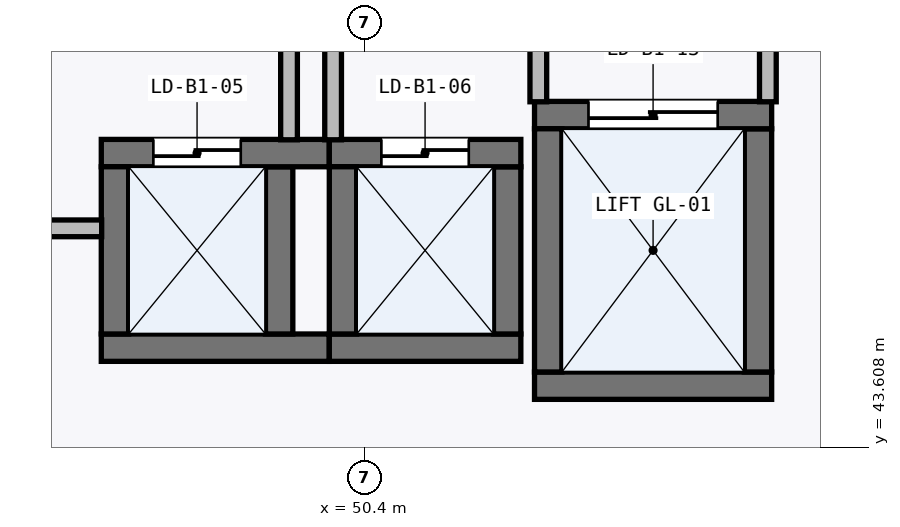
"""IFC4 building model, lengths in metres.
Left out: names, types, materials, properties, quantities, classifications, styles, units other than length and angle.
Written with IfcOpenShell. Run it as: python <this file> out.ifc"""

import sys

from ifc_helpers import new_model, si_unit, direction, frame, frame_2d, origin, place, context, subcontext, project, spatial, rectangle, extrude, element, fill, save


model = new_model("IFC4")
c1 = context("Model", 3, precision=1e-05, world=origin(), true_north=direction((0.0, 1.0)))
c2 = subcontext(c1, "Body", "Model", "MODEL_VIEW")
j1 = project(units=[si_unit("LENGTHUNIT", "METRE"), si_unit("PLANEANGLEUNIT", "RADIAN")], contexts=[c1])
p1 = place(None, origin())
s1 = spatial("IfcSite", under=j1, at=p1, CompositionType="ELEMENT")
p2 = place(p1, origin())
s2 = spatial("IfcBuilding", under=s1, at=p2, CompositionType="ELEMENT")
p3 = place(p2, frame((0.0, 0.0, -5.4)))
s3 = spatial("IfcBuildingStorey", under=s2, at=p3, CompositionType="ELEMENT", Elevation=-5.4)
p4 = place(p3, frame((46.94, 44.92, 0.0), z_axis=(0.0, 0.0, 1.0), x_axis=(1.0, 0.0, 0.0)))
e1 = element("IfcWall", 1, at=p4, inside=s3, PredefinedType="SHEAR", context=c2, shape_type="SweptSolid", body=[
    extrude(rectangle(XDim=3.0, YDim=0.36, at=frame_2d((1.5, 0.0))), origin(), (0.0, 0.0, 1.0), 5.145),
])
p5 = place(p3, frame((49.28, 45.1, 0.0), z_axis=(0.0, 0.0, 1.0), x_axis=(0.0, 1.0, 0.0)))
e2 = element("IfcWall", 2, at=p5, inside=s3, PredefinedType="SHEAR", context=c2, shape_type="SweptSolid", body=[
    extrude(rectangle(XDim=2.2, YDim=0.36, at=frame_2d((1.1, 0.0))), origin(), (0.0, 0.0, 1.0), 5.145),
])
p6 = place(p3, frame((49.94, 47.48, 0.0), z_axis=(0.0, 0.0, 1.0), x_axis=(-1.0, 0.0, 0.0)))
e3 = element("IfcWall", 3, at=p6, inside=s3, PredefinedType="SHEAR", context=c2, shape_type="SweptSolid", body=[
    extrude(rectangle(XDim=3.0, YDim=0.36, at=frame_2d((1.5, 0.0))), origin(), (0.0, 0.0, 1.0), 5.145),
])
p7 = place(p6, frame((1.165, 0.0, 0.0)))
e4 = element("IfcOpeningElement", 4, at=p7, cuts=e3, PredefinedType="OPENING", context=c2, shape_type="SweptSolid", body=[
    extrude(rectangle(XDim=1.15, YDim=2.2, at=frame_2d((0.575, 1.1))), frame((0.0, 0.19, 0.0), z_axis=(0.0, -1.0, 0.0), x_axis=(1.0, 0.0, 0.0)), (0.0, 0.0, 1.0), 0.38),
])
p8 = place(p3, frame((47.12, 47.3, 0.0), z_axis=(0.0, 0.0, 1.0), x_axis=(0.0, -1.0, 0.0)))
e5 = element("IfcWall", 5, at=p8, inside=s3, PredefinedType="SHEAR", context=c2, shape_type="SweptSolid", body=[
    extrude(rectangle(XDim=2.2, YDim=0.36, at=frame_2d((1.1, 0.0))), origin(), (0.0, 0.0, 1.0), 5.145),
])
p9 = place(p3, frame((49.94, 44.92, 0.0), z_axis=(0.0, 0.0, 1.0), x_axis=(1.0, 0.0, 0.0)))
e6 = element("IfcWall", 6, at=p9, inside=s3, PredefinedType="SHEAR", context=c2, shape_type="SweptSolid", body=[
    extrude(rectangle(XDim=2.52, YDim=0.36, at=frame_2d((1.26, 0.0))), origin(), (0.0, 0.0, 1.0), 5.145),
])
p10 = place(p3, frame((52.28, 45.1, 0.0), z_axis=(0.0, 0.0, 1.0), x_axis=(0.0, 1.0, 0.0)))
e7 = element("IfcWall", 7, at=p10, inside=s3, PredefinedType="SHEAR", context=c2, shape_type="SweptSolid", body=[
    extrude(rectangle(XDim=2.2, YDim=0.36, at=frame_2d((1.1, 0.0))), origin(), (0.0, 0.0, 1.0), 5.145),
])
p11 = place(p3, frame((52.46, 47.48, 0.0), z_axis=(0.0, 0.0, 1.0), x_axis=(-1.0, 0.0, 0.0)))
e8 = element("IfcWall", 8, at=p11, inside=s3, PredefinedType="SHEAR", context=c2, shape_type="SweptSolid", body=[
    extrude(rectangle(XDim=2.52, YDim=0.36, at=frame_2d((1.26, 0.0))), origin(), (0.0, 0.0, 1.0), 5.145),
])
p12 = place(p11, frame((0.685, 0.0, 0.0)))
e9 = element("IfcOpeningElement", 9, at=p12, cuts=e8, PredefinedType="OPENING", context=c2, shape_type="SweptSolid", body=[
    extrude(rectangle(XDim=1.15, YDim=2.2, at=frame_2d((0.575, 1.1))), frame((0.0, 0.19, 0.0), z_axis=(0.0, -1.0, 0.0), x_axis=(1.0, 0.0, 0.0)), (0.0, 0.0, 1.0), 0.38),
])
p13 = place(p3, frame((50.12, 47.3, 0.0), z_axis=(0.0, 0.0, 1.0), x_axis=(0.0, -1.0, 0.0)))
e10 = element("IfcWall", 10, at=p13, inside=s3, PredefinedType="SHEAR", context=c2, shape_type="SweptSolid", body=[
    extrude(rectangle(XDim=2.2, YDim=0.36, at=frame_2d((1.1, 0.0))), origin(), (0.0, 0.0, 1.0), 5.145),
])
p14 = place(p3, frame((52.64, 44.42, 0.0), z_axis=(0.0, 0.0, 1.0), x_axis=(1.0, 0.0, 0.0)))
e11 = element("IfcWall", 11, at=p14, inside=s3, PredefinedType="SHEAR", context=c2, shape_type="SweptSolid", body=[
    extrude(rectangle(XDim=3.12, YDim=0.36, at=frame_2d((1.56, 0.0))), origin(), (0.0, 0.0, 1.0), 5.145),
])
p15 = place(p3, frame((55.58, 44.6, 0.0), z_axis=(0.0, 0.0, 1.0), x_axis=(0.0, 1.0, 0.0)))
e12 = element("IfcWall", 12, at=p15, inside=s3, PredefinedType="SHEAR", context=c2, shape_type="SweptSolid", body=[
    extrude(rectangle(XDim=3.2, YDim=0.36, at=frame_2d((1.6, 0.0))), origin(), (0.0, 0.0, 1.0), 5.145),
])
p16 = place(p3, frame((55.76, 47.98, 0.0), z_axis=(0.0, 0.0, 1.0), x_axis=(-1.0, 0.0, 0.0)))
e13 = element("IfcWall", 13, at=p16, inside=s3, PredefinedType="SHEAR", context=c2, shape_type="SweptSolid", body=[
    extrude(rectangle(XDim=3.12, YDim=0.36, at=frame_2d((1.56, 0.0))), origin(), (0.0, 0.0, 1.0), 5.145),
])
p17 = place(p16, frame((0.71, 0.0, 0.0)))
e14 = element("IfcOpeningElement", 14, at=p17, cuts=e13, PredefinedType="OPENING", context=c2, shape_type="SweptSolid", body=[
    extrude(rectangle(XDim=1.7, YDim=2.3, at=frame_2d((0.85, 1.15))), frame((0.0, 0.19, 0.0), z_axis=(0.0, -1.0, 0.0), x_axis=(1.0, 0.0, 0.0)), (0.0, 0.0, 1.0), 0.38),
])
p18 = place(p3, frame((52.82, 47.8, 0.0), z_axis=(0.0, 0.0, 1.0), x_axis=(0.0, -1.0, 0.0)))
e15 = element("IfcWall", 15, at=p18, inside=s3, PredefinedType="SHEAR", context=c2, shape_type="SweptSolid", body=[
    extrude(rectangle(XDim=3.2, YDim=0.36, at=frame_2d((1.6, 0.0))), origin(), (0.0, 0.0, 1.0), 5.145),
])
for number, where, z_axis, x_axis in (
    (16, (55.71, 49.39, 0.0), (0.0, 0.0, 1.0), (0.0, -1.0, 0.0)),
    (17, (52.69, 48.155, 0.0), (0.0, 0.0, 1.0), (0.0, 1.0, 0.0)),
):
    element("IfcWall", number, at=place(p3, frame(where, z_axis=z_axis, x_axis=x_axis)), inside=s3, PredefinedType="PARTITIONING", context=c2, shape_type="SweptSolid", body=[
        extrude(rectangle(XDim=1.235, YDim=0.22, at=frame_2d((0.617, 0.0))), origin(), (0.0, 0.0, 1.0), 5.145),
    ])
for number, where, z_axis, x_axis in (
    (18, (49.99, 47.655, 0.0), (0.0, 0.0, 1.0), (0.0, 1.0, 0.0)),
    (19, (49.41, 49.39, 0.0), (0.0, 0.0, 1.0), (0.0, -1.0, 0.0)),
):
    element("IfcWall", number, at=place(p3, frame(where, z_axis=z_axis, x_axis=x_axis)), inside=s3, PredefinedType="PARTITIONING", context=c2, shape_type="SweptSolid", body=[
        extrude(rectangle(XDim=1.735, YDim=0.22, at=frame_2d((0.867, 0.0))), origin(), (0.0, 0.0, 1.0), 5.145),
    ])
p19 = place(p3, frame((46.945, 46.49, 0.0), z_axis=(0.0, 0.0, 1.0), x_axis=(-1.0, 0.0, 0.0)))
e20 = element("IfcWall", 20, at=p19, inside=s3, PredefinedType="PARTITIONING", context=c2, shape_type="SweptSolid", body=[
    extrude(rectangle(XDim=1.43, YDim=0.22, at=frame_2d((0.715, 0.0))), origin(), (0.0, 0.0, 1.0), 5.145),
])
p20 = place(p7, frame((1.15, 0.0, 0.0), z_axis=(0.0, 0.0, 1.0), x_axis=(-1.0, 0.0, 0.0)))
e21 = element("IfcDoor", 21, at=p20, inside=s3, OperationType="DOUBLE_DOOR_SLIDING", PredefinedType="DOOR", context=c2, shape_type="SweptSolid", body=[
    extrude(rectangle(XDim=1.15, YDim=2.2, at=frame_2d((0.575, 1.1))), frame((0.0, 0.025, 0.0), z_axis=(0.0, -1.0, 0.0), x_axis=(1.0, 0.0, 0.0)), (0.0, 0.0, 1.0), 0.05),
])
fill(e4, e21)
p21 = place(p12, frame((1.15, 0.0, 0.0), z_axis=(0.0, 0.0, 1.0), x_axis=(-1.0, 0.0, 0.0)))
e22 = element("IfcDoor", 22, at=p21, inside=s3, OperationType="DOUBLE_DOOR_SLIDING", PredefinedType="DOOR", context=c2, shape_type="SweptSolid", body=[
    extrude(rectangle(XDim=1.15, YDim=2.2, at=frame_2d((0.575, 1.1))), frame((0.0, 0.025, 0.0), z_axis=(0.0, -1.0, 0.0), x_axis=(1.0, 0.0, 0.0)), (0.0, 0.0, 1.0), 0.05),
])
fill(e9, e22)
p22 = place(p17, frame((1.7, 0.0, 0.0), z_axis=(0.0, 0.0, 1.0), x_axis=(-1.0, 0.0, 0.0)))
e23 = element("IfcDoor", 23, at=p22, inside=s3, OperationType="DOUBLE_DOOR_SLIDING", PredefinedType="DOOR", context=c2, shape_type="SweptSolid", body=[
    extrude(rectangle(XDim=1.7, YDim=2.3, at=frame_2d((0.85, 1.15))), frame((0.0, 0.025, 0.0), z_axis=(0.0, -1.0, 0.0), x_axis=(1.0, 0.0, 0.0)), (0.0, 0.0, 1.0), 0.05),
])
fill(e14, e23)
save(model, sys.argv[1])
